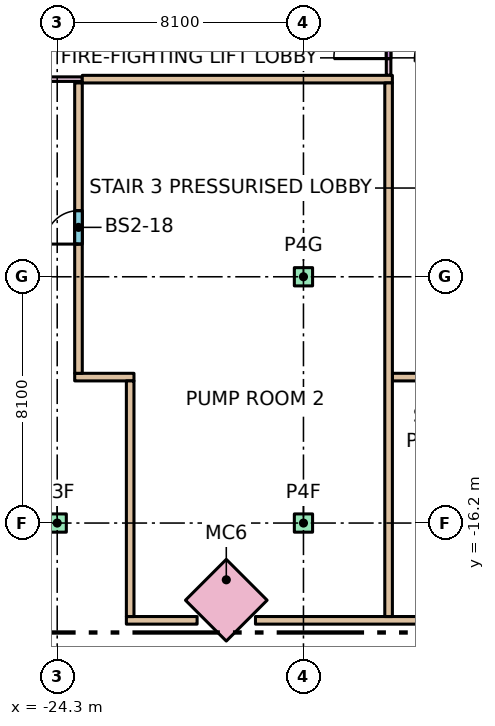
"""IFC4 building model, lengths in metres.
Left out: names, types, materials, properties, quantities, classifications, styles, units other than length and angle.
Written with IfcOpenShell. Run it as: python <this file> out.ifc"""

import sys

from ifc_helpers import new_model, si_unit, direction, frame, frame_2d, origin, origin_2d, place, context, subcontext, project, spatial, rectangle, extrude, element, fill, save


model = new_model("IFC4")
c1 = context("Model", 3, precision=1e-05, world=origin(), true_north=direction((0.0, 1.0)))
c2 = subcontext(c1, "Body", "Model", "MODEL_VIEW")
j1 = project(units=[si_unit("LENGTHUNIT", "METRE"), si_unit("PLANEANGLEUNIT", "RADIAN")], contexts=[c1])
p1 = place(None, origin())
s1 = spatial("IfcSite", under=j1, at=p1, CompositionType="ELEMENT")
p2 = place(p1, origin())
s2 = spatial("IfcBuilding", under=s1, at=p2, CompositionType="ELEMENT")
p3 = place(p2, frame((0.0, 0.0, -7.2)))
s3 = spatial("IfcBuildingStorey", under=s2, at=p3, CompositionType="ELEMENT", Elevation=-7.2)
for number, where, z_axis, x_axis in (
    (1, (-24.3, -16.2, 0.0), (0.0, 0.0, 1.0), (1.0, 0.0, 0.0)),
    (2, (-16.2, -16.2, 0.0), (0.0, 0.0, 1.0), (1.0, 0.0, 0.0)),
    (3, (-16.2, -8.1, 0.0), (0.0, 0.0, 1.0), (1.0, 0.0, 0.0)),
):
    element("IfcColumn", number, at=place(p3, frame(where, z_axis=z_axis, x_axis=x_axis)), inside=s3, PredefinedType="COLUMN", context=c2, shape_type="SweptSolid", body=[
        extrude(rectangle(XDim=0.6, YDim=0.6, at=origin_2d()), origin(), (0.0, 0.0, 1.0), 3.6),
    ])
p4 = place(p3, frame((-18.738, -18.738, 0.0), z_axis=(0.0, 0.0, 1.0), x_axis=(0.707106781187, -0.707106781187, 0.0)))
e4 = element("IfcColumn", 4, at=p4, inside=s3, PredefinedType="COLUMN", context=c2, shape_type="SweptSolid", body=[
    extrude(rectangle(XDim=1.9, YDim=1.9, at=origin_2d()), origin(), (0.0, 0.0, 1.0), 3.6),
])
p5 = place(p3, frame((-26.675, -1.6, 0.0), z_axis=(0.0, 0.0, 1.0), x_axis=(1.0, 0.0, 0.0)))
e5 = element("IfcWall", 5, at=p5, inside=s3, PredefinedType="PARTITIONING", context=c2, shape_type="SweptSolid", body=[
    extrude(rectangle(XDim=3.2, YDim=0.15, at=frame_2d((1.6, 0.0))), origin(), (0.0, 0.0, 1.0), 3.28),
])
p6 = place(p3, frame((-22.025, -19.4, 0.0), z_axis=(0.0, 0.0, 1.0), x_axis=(1.0, 0.0, 0.0)))
e6 = element("IfcWall", 6, at=p6, inside=s3, PredefinedType="PARTITIONING", context=c2, shape_type="SweptSolid", body=[
    extrude(rectangle(XDim=2.327, YDim=0.25, at=frame_2d((1.163, 0.0))), origin(), (0.0, 0.0, 1.0), 3.28),
])
p7 = place(p3, frame((-17.778, -19.4, 0.0), z_axis=(0.0, 0.0, 1.0), x_axis=(1.0, 0.0, 0.0)))
e7 = element("IfcWall", 7, at=p7, inside=s3, PredefinedType="PARTITIONING", context=c2, shape_type="SweptSolid", body=[
    extrude(rectangle(XDim=35.557, YDim=0.25, at=frame_2d((17.778, 0.0))), origin(), (0.0, 0.0, 1.0), 3.28),
])
p8 = place(p7, frame((7.753, 0.0, 0.0)))
e8 = element("IfcOpeningElement", 8, at=p8, cuts=e7, PredefinedType="OPENING", context=c2, shape_type="SweptSolid", body=[
    extrude(rectangle(XDim=1.1, YDim=2.1, at=frame_2d((0.55, 1.05))), frame((0.0, 0.135, 0.0), z_axis=(0.0, -1.0, 0.0), x_axis=(1.0, 0.0, 0.0)), (0.0, 0.0, 1.0), 0.27),
])
p9 = place(p7, frame((15.41, 0.0, 0.0)))
e9 = element("IfcOpeningElement", 9, at=p9, cuts=e7, PredefinedType="OPENING", context=c2, shape_type="SweptSolid", body=[
    extrude(rectangle(XDim=1.1, YDim=2.1, at=frame_2d((0.55, 1.05))), frame((0.0, 0.135, 0.0), z_axis=(0.0, -1.0, 0.0), x_axis=(1.0, 0.0, 0.0)), (0.0, 0.0, 1.0), 0.27),
])
p10 = place(p7, frame((22.167, 0.0, 0.0)))
e10 = element("IfcOpeningElement", 10, at=p10, cuts=e7, PredefinedType="OPENING", context=c2, shape_type="SweptSolid", body=[
    extrude(rectangle(XDim=1.1, YDim=2.1, at=frame_2d((0.55, 1.05))), frame((0.0, 0.135, 0.0), z_axis=(0.0, -1.0, 0.0), x_axis=(1.0, 0.0, 0.0)), (0.0, 0.0, 1.0), 0.27),
])
p11 = place(p3, frame((-23.725, -11.4, 0.0), z_axis=(0.0, 0.0, 1.0), x_axis=(1.0, 0.0, 0.0)))
e11 = element("IfcWall", 11, at=p11, inside=s3, PredefinedType="PARTITIONING", context=c2, shape_type="SweptSolid", body=[
    extrude(rectangle(XDim=1.95, YDim=0.25, at=frame_2d((0.975, 0.0))), origin(), (0.0, 0.0, 1.0), 3.28),
])
p12 = place(p3, frame((-23.6, -11.275, 0.0), z_axis=(0.0, 0.0, 1.0), x_axis=(0.0, 1.0, 0.0)))
e12 = element("IfcWall", 12, at=p12, inside=s3, PredefinedType="PARTITIONING", context=c2, shape_type="SweptSolid", body=[
    extrude(rectangle(XDim=9.55, YDim=0.25, at=frame_2d((4.775, 0.0))), origin(), (0.0, 0.0, 1.0), 3.28),
])
p13 = place(p12, frame((4.25, 0.0, 0.0)))
e13 = element("IfcOpeningElement", 13, at=p13, cuts=e12, PredefinedType="OPENING", context=c2, shape_type="SweptSolid", body=[
    extrude(rectangle(XDim=1.1, YDim=2.1, at=frame_2d((0.55, 1.05))), frame((0.0, 0.135, 0.0), z_axis=(0.0, -1.0, 0.0), x_axis=(1.0, 0.0, 0.0)), (0.0, 0.0, 1.0), 0.27),
])
p14 = place(p3, frame((-21.9, -19.275, 0.0), z_axis=(0.0, 0.0, 1.0), x_axis=(0.0, 1.0, 0.0)))
e14 = element("IfcWall", 14, at=p14, inside=s3, PredefinedType="PARTITIONING", context=c2, shape_type="SweptSolid", body=[
    extrude(rectangle(XDim=7.75, YDim=0.25, at=frame_2d((3.875, 0.0))), origin(), (0.0, 0.0, 1.0), 3.28),
])
p15 = place(p3, frame((-13.4, -1.475, 0.0), z_axis=(0.0, 0.0, 1.0), x_axis=(0.0, 1.0, 0.0)))
e15 = element("IfcWall", 15, at=p15, inside=s3, PredefinedType="PARTITIONING", context=c2, shape_type="SweptSolid", body=[
    extrude(rectangle(XDim=2.95, YDim=0.15, at=frame_2d((1.475, 0.0))), origin(), (0.0, 0.0, 1.0), 3.28),
])
p16 = place(p15, frame((0.55, 0.0, 0.0)))
e16 = element("IfcOpeningElement", 16, at=p16, cuts=e15, PredefinedType="OPENING", context=c2, shape_type="SweptSolid", body=[
    extrude(rectangle(XDim=1.8, YDim=2.4, at=frame_2d((0.9, 1.2))), frame((0.0, 0.085, 0.0), z_axis=(0.0, -1.0, 0.0), x_axis=(1.0, 0.0, 0.0)), (0.0, 0.0, 1.0), 0.17),
])
p17 = place(p3, frame((-23.475, -1.6, 0.0), z_axis=(0.0, 0.0, 1.0), x_axis=(1.0, 0.0, 0.0)))
e17 = element("IfcWall", 17, at=p17, inside=s3, PredefinedType="PARTITIONING", context=c2, shape_type="SweptSolid", body=[
    extrude(rectangle(XDim=10.2, YDim=0.25, at=frame_2d((5.1, 0.0))), origin(), (0.0, 0.0, 1.0), 3.28),
])
p18 = place(p3, frame((-13.275, -11.4, 0.0), z_axis=(0.0, 0.0, 1.0), x_axis=(1.0, 0.0, 0.0)))
e18 = element("IfcWall", 18, at=p18, inside=s3, PredefinedType="PARTITIONING", context=c2, shape_type="SweptSolid", body=[
    extrude(rectangle(XDim=34.55, YDim=0.25, at=frame_2d((17.275, 0.0))), origin(), (0.0, 0.0, 1.0), 3.28),
])
p19 = place(p3, frame((-13.4, -19.275, 0.0), z_axis=(0.0, 0.0, 1.0), x_axis=(0.0, 1.0, 0.0)))
e19 = element("IfcWall", 19, at=p19, inside=s3, PredefinedType="PARTITIONING", context=c2, shape_type="SweptSolid", body=[
    extrude(rectangle(XDim=17.55, YDim=0.25, at=frame_2d((8.775, 0.0))), origin(), (0.0, 0.0, 1.0), 3.28),
])
p20 = place(p13, origin())
e20 = element("IfcDoor", 20, at=p20, inside=s3, OperationType="SINGLE_SWING_LEFT", PredefinedType="DOOR", context=c2, shape_type="SweptSolid", body=[
    extrude(rectangle(XDim=1.1, YDim=2.1, at=frame_2d((0.55, 1.05))), frame((0.0, 0.025, 0.0), z_axis=(0.0, -1.0, 0.0), x_axis=(1.0, 0.0, 0.0)), (0.0, 0.0, 1.0), 0.05),
])
fill(e13, e20)
p21 = place(p16, origin())
e21 = element("IfcDoor", 21, at=p21, inside=s3, OperationType="SINGLE_SWING_LEFT", PredefinedType="DOOR", context=c2, shape_type="SweptSolid", body=[
    extrude(rectangle(XDim=1.8, YDim=2.4, at=frame_2d((0.9, 1.2))), frame((0.0, 0.025, 0.0), z_axis=(0.0, -1.0, 0.0), x_axis=(1.0, 0.0, 0.0)), (0.0, 0.0, 1.0), 0.05),
])
fill(e16, e21)
save(model, sys.argv[1])
